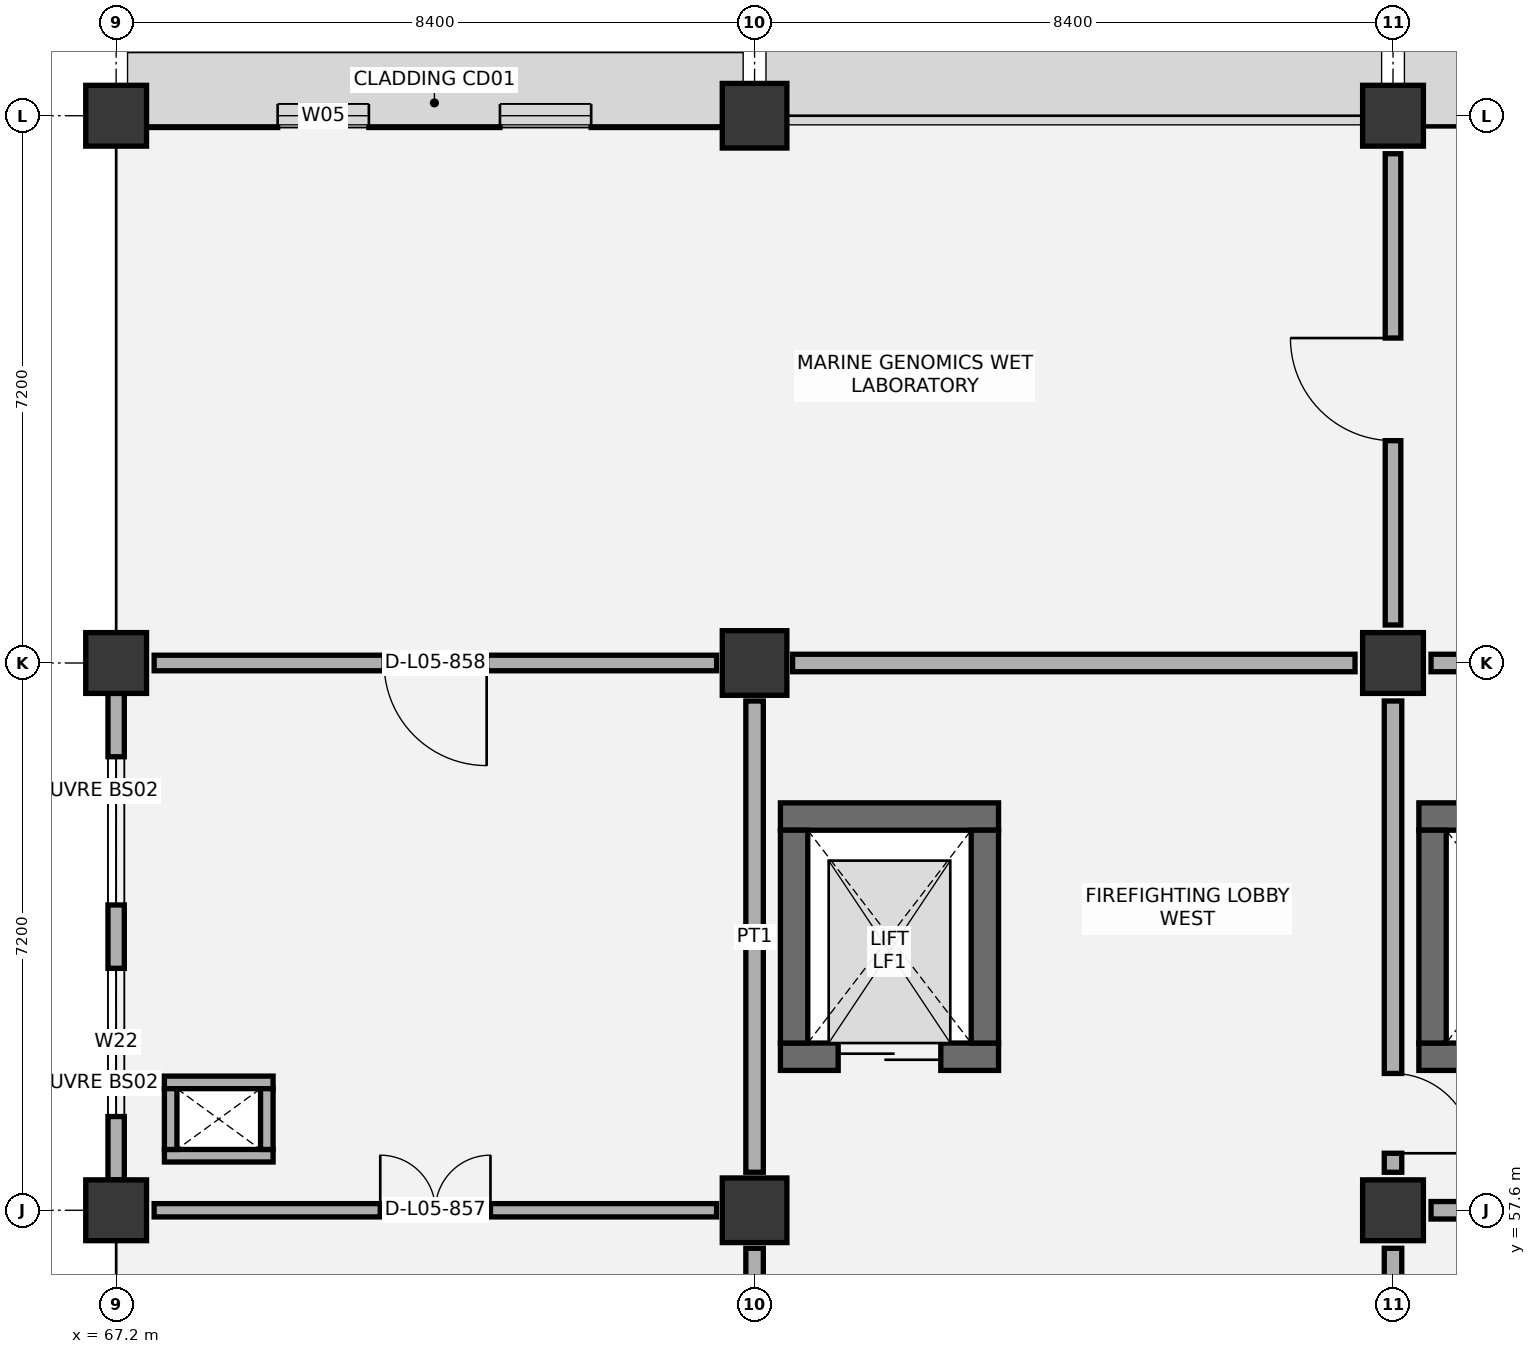
"""IFC4 building model, lengths in metres.
Left out: names, types, materials, properties, quantities, classifications, styles, units other than length and angle.
Written with IfcOpenShell. Run it as: python <this file> out.ifc"""

import sys

from ifc_helpers import new_model, si_unit, direction, frame, frame_2d, origin, origin_2d, place, context, subcontext, project, spatial, rectangle, extrude, element, fill, save


model = new_model("IFC4")
c1 = context("Model", 3, precision=1e-05, world=origin(), true_north=direction((0.0, 1.0)))
c2 = subcontext(c1, "Body", "Model", "MODEL_VIEW")
j1 = project(units=[si_unit("LENGTHUNIT", "METRE"), si_unit("PLANEANGLEUNIT", "RADIAN")], contexts=[c1])
p1 = place(None, origin())
s1 = spatial("IfcSite", under=j1, at=p1, CompositionType="ELEMENT")
p2 = place(p1, origin())
s2 = spatial("IfcBuilding", under=s1, at=p2, CompositionType="ELEMENT")
p3 = place(p2, frame((0.0, 0.0, 27.0)))
s3 = spatial("IfcBuildingStorey", under=s2, at=p3, CompositionType="ELEMENT", Elevation=27.0)
for number, where, z_axis, x_axis in (
    (1, (67.2, 57.6, 0.0), (0.0, 0.0, 1.0), (1.0, 0.0, 0.0)),
    (2, (67.2, 64.8, 0.0), (0.0, 0.0, 1.0), (1.0, 0.0, 0.0)),
    (3, (67.2, 72.0, 0.0), (0.0, 0.0, 1.0), (1.0, 0.0, 0.0)),
):
    element("IfcColumn", number, at=place(p3, frame(where, z_axis=z_axis, x_axis=x_axis)), inside=s3, PredefinedType="COLUMN", context=c2, shape_type="SweptSolid", body=[
        extrude(rectangle(XDim=0.8, YDim=0.8, at=origin_2d()), origin(), (0.0, 0.0, 1.0), 4.2),
    ])
for number, where, z_axis, x_axis in (
    (4, (75.6, 57.6, 0.0), (0.0, 0.0, 1.0), (1.0, 0.0, 0.0)),
    (5, (75.6, 64.8, 0.0), (0.0, 0.0, 1.0), (1.0, 0.0, 0.0)),
    (6, (75.6, 72.0, 0.0), (0.0, 0.0, 1.0), (1.0, 0.0, 0.0)),
):
    element("IfcColumn", number, at=place(p3, frame(where, z_axis=z_axis, x_axis=x_axis)), inside=s3, PredefinedType="COLUMN", context=c2, shape_type="SweptSolid", body=[
        extrude(rectangle(XDim=0.85, YDim=0.85, at=origin_2d()), origin(), (0.0, 0.0, 1.0), 4.2),
    ])
for number, where, z_axis, x_axis in (
    (7, (84.0, 57.6, 0.0), (0.0, 0.0, 1.0), (1.0, 0.0, 0.0)),
    (8, (84.0, 64.8, 0.0), (0.0, 0.0, 1.0), (1.0, 0.0, 0.0)),
    (9, (84.0, 72.0, 0.0), (0.0, 0.0, 1.0), (1.0, 0.0, 0.0)),
):
    element("IfcColumn", number, at=place(p3, frame(where, z_axis=z_axis, x_axis=x_axis)), inside=s3, PredefinedType="COLUMN", context=c2, shape_type="SweptSolid", body=[
        extrude(rectangle(XDim=0.8, YDim=0.8, at=origin_2d()), origin(), (0.0, 0.0, 1.0), 4.2),
    ])
p4 = place(p3, frame((75.94, 62.78, 0.0), z_axis=(0.0, 0.0, 1.0), x_axis=(1.0, 0.0, 0.0)))
e10 = element("IfcWall", 10, at=p4, inside=s3, PredefinedType="SHEAR", context=c2, shape_type="SweptSolid", body=[
    extrude(rectangle(XDim=2.87, YDim=0.36, at=frame_2d((1.435, 0.0))), origin(), (0.0, 0.0, 1.0), 3.92),
])
p5 = place(p3, frame((75.94, 59.62, 0.0), z_axis=(0.0, 0.0, 1.0), x_axis=(1.0, 0.0, 0.0)))
e11 = element("IfcWall", 11, at=p5, inside=s3, PredefinedType="SHEAR", context=c2, shape_type="SweptSolid", body=[
    extrude(rectangle(XDim=2.87, YDim=0.36, at=frame_2d((1.435, 0.0))), origin(), (0.0, 0.0, 1.0), 3.92),
])
p6 = place(p5, frame((0.76, 0.0, 0.0)))
e12 = element("IfcOpeningElement", 12, at=p6, cuts=e11, PredefinedType="OPENING", context=c2, shape_type="SweptSolid", body=[
    extrude(rectangle(XDim=1.35, YDim=2.2, at=frame_2d((0.675, 1.1))), frame((0.0, 0.19, 0.0), z_axis=(0.0, -1.0, 0.0), x_axis=(1.0, 0.0, 0.0)), (0.0, 0.0, 1.0), 0.38),
])
for number, where, z_axis, x_axis in (
    (13, (76.12, 59.8, 0.0), (0.0, 0.0, 1.0), (0.0, 1.0, 0.0)),
    (14, (78.63, 59.8, 0.0), (0.0, 0.0, 1.0), (0.0, 1.0, 0.0)),
):
    element("IfcWall", number, at=place(p3, frame(where, z_axis=z_axis, x_axis=x_axis)), inside=s3, PredefinedType="SHEAR", context=c2, shape_type="SweptSolid", body=[
        extrude(rectangle(XDim=2.8, YDim=0.36, at=frame_2d((1.4, 0.0))), origin(), (0.0, 0.0, 1.0), 3.92),
    ])
p7 = place(p3, frame((84.34, 62.78, 0.0), z_axis=(0.0, 0.0, 1.0), x_axis=(1.0, 0.0, 0.0)))
e15 = element("IfcWall", 15, at=p7, inside=s3, PredefinedType="SHEAR", context=c2, shape_type="SweptSolid", body=[
    extrude(rectangle(XDim=7.77, YDim=0.36, at=frame_2d((3.885, 0.0))), origin(), (0.0, 0.0, 1.0), 3.92),
])
p8 = place(p3, frame((84.34, 59.62, 0.0), z_axis=(0.0, 0.0, 1.0), x_axis=(1.0, 0.0, 0.0)))
e16 = element("IfcWall", 16, at=p8, inside=s3, PredefinedType="SHEAR", context=c2, shape_type="SweptSolid", body=[
    extrude(rectangle(XDim=2.66, YDim=0.36, at=frame_2d((1.33, 0.0))), origin(), (0.0, 0.0, 1.0), 3.92),
])
p9 = place(p8, frame((0.78, 0.0, 0.0)))
e17 = element("IfcOpeningElement", 17, at=p9, cuts=e16, PredefinedType="OPENING", context=c2, shape_type="SweptSolid", body=[
    extrude(rectangle(XDim=1.1, YDim=2.15, at=frame_2d((0.55, 1.075))), frame((0.0, 0.19, 0.0), z_axis=(0.0, -1.0, 0.0), x_axis=(1.0, 0.0, 0.0)), (0.0, 0.0, 1.0), 0.38),
])
p10 = place(p3, frame((84.52, 59.8, 0.0), z_axis=(0.0, 0.0, 1.0), x_axis=(0.0, 1.0, 0.0)))
e18 = element("IfcWall", 18, at=p10, inside=s3, PredefinedType="SHEAR", context=c2, shape_type="SweptSolid", body=[
    extrude(rectangle(XDim=2.8, YDim=0.36, at=frame_2d((1.4, 0.0))), origin(), (0.0, 0.0, 1.0), 3.92),
])
p11 = place(p3, frame((67.2, 58.0, 0.0), z_axis=(0.0, 0.0, 1.0), x_axis=(0.0, 1.0, 0.0)))
e19 = element("IfcWall", 19, at=p11, inside=s3, PredefinedType="SOLIDWALL", context=c2, shape_type="SweptSolid", body=[
    extrude(rectangle(XDim=6.4, YDim=0.215, at=frame_2d((3.2, 0.0))), origin(), (0.0, 0.0, 1.0), 3.365),
])
p12 = place(p11, frame((0.833, 0.0, 0.9)))
e20 = element("IfcOpeningElement", 20, at=p12, cuts=e19, PredefinedType="OPENING", context=c2, shape_type="SweptSolid", body=[
    extrude(rectangle(XDim=1.95, YDim=1.95, at=frame_2d((0.975, 0.975))), frame((0.0, 0.117, 0.0), z_axis=(0.0, -1.0, 0.0), x_axis=(1.0, 0.0, 0.0)), (0.0, 0.0, 1.0), 0.235),
])
p13 = place(p11, frame((3.617, 0.0, 0.9)))
e21 = element("IfcOpeningElement", 21, at=p13, cuts=e19, PredefinedType="OPENING", context=c2, shape_type="SweptSolid", body=[
    extrude(rectangle(XDim=1.95, YDim=1.95, at=frame_2d((0.975, 0.975))), frame((0.0, 0.117, 0.0), z_axis=(0.0, -1.0, 0.0), x_axis=(1.0, 0.0, 0.0)), (0.0, 0.0, 1.0), 0.235),
])
p14 = place(p3, frame((67.6, 72.0, 0.0), z_axis=(0.0, 0.0, 1.0), x_axis=(1.0, 0.0, 0.0)))
e22 = element("IfcWall", 22, at=p14, inside=s3, PredefinedType="SOLIDWALL", context=c2, shape_type="SweptSolid", body=[
    extrude(rectangle(XDim=7.575, YDim=0.31, at=frame_2d((3.788, 0.0))), origin(), (0.0, 0.0, 1.0), 3.365),
])
p15 = place(p14, frame((1.725, 0.0, 0.9)))
e23 = element("IfcOpeningElement", 23, at=p15, cuts=e22, PredefinedType="OPENING", context=c2, shape_type="SweptSolid", body=[
    extrude(rectangle(XDim=1.2, YDim=1.8, at=frame_2d((0.6, 0.9))), frame((0.0, 0.165, 0.0), z_axis=(0.0, -1.0, 0.0), x_axis=(1.0, 0.0, 0.0)), (0.0, 0.0, 1.0), 0.33),
])
p16 = place(p14, frame((4.65, 0.0, 0.9)))
e24 = element("IfcOpeningElement", 24, at=p16, cuts=e22, PredefinedType="OPENING", context=c2, shape_type="SweptSolid", body=[
    extrude(rectangle(XDim=1.2, YDim=1.8, at=frame_2d((0.6, 0.9))), frame((0.0, 0.165, 0.0), z_axis=(0.0, -1.0, 0.0), x_axis=(1.0, 0.0, 0.0)), (0.0, 0.0, 1.0), 0.33),
])
p17 = place(p3, frame((84.4, 72.0, 0.0), z_axis=(0.0, 0.0, 1.0), x_axis=(1.0, 0.0, 0.0)))
e25 = element("IfcWall", 25, at=p17, inside=s3, PredefinedType="SOLIDWALL", context=c2, shape_type="SweptSolid", body=[
    extrude(rectangle(XDim=7.6, YDim=0.27, at=frame_2d((3.8, 0.0))), origin(), (0.0, 0.0, 1.0), 3.365),
])
p18 = place(p17, frame((1.333, 0.0, 0.9)))
e26 = element("IfcOpeningElement", 26, at=p18, cuts=e25, PredefinedType="OPENING", context=c2, shape_type="SweptSolid", body=[
    extrude(rectangle(XDim=1.8, YDim=1.8, at=frame_2d((0.9, 0.9))), frame((0.0, 0.145, 0.0), z_axis=(0.0, -1.0, 0.0), x_axis=(1.0, 0.0, 0.0)), (0.0, 0.0, 1.0), 0.29),
])
p19 = place(p17, frame((4.467, 0.0, 0.9)))
e27 = element("IfcOpeningElement", 27, at=p19, cuts=e25, PredefinedType="OPENING", context=c2, shape_type="SweptSolid", body=[
    extrude(rectangle(XDim=1.8, YDim=1.8, at=frame_2d((0.9, 0.9))), frame((0.0, 0.145, 0.0), z_axis=(0.0, -1.0, 0.0), x_axis=(1.0, 0.0, 0.0)), (0.0, 0.0, 1.0), 0.29),
])
for number, where, z_axis, x_axis in (
    (28, (67.835, 58.317, 0.0), (0.0, 0.0, 1.0), (1.0, 0.0, 0.0)),
    (29, (67.835, 59.282, 0.0), (0.0, 0.0, 1.0), (1.0, 0.0, 0.0)),
):
    element("IfcWall", number, at=place(p3, frame(where, z_axis=z_axis, x_axis=x_axis)), inside=s3, PredefinedType="PARTITIONING", context=c2, shape_type="SweptSolid", body=[
        extrude(rectangle(XDim=1.43, YDim=0.165, at=frame_2d((0.715, 0.0))), origin(), (0.0, 0.0, 1.0), 3.92),
    ])
for number, where, z_axis, x_axis in (
    (30, (67.917, 58.4, 0.0), (0.0, 0.0, 1.0), (0.0, 1.0, 0.0)),
    (31, (69.183, 58.4, 0.0), (0.0, 0.0, 1.0), (0.0, 1.0, 0.0)),
):
    element("IfcWall", number, at=place(p3, frame(where, z_axis=z_axis, x_axis=x_axis)), inside=s3, PredefinedType="PARTITIONING", context=c2, shape_type="SweptSolid", body=[
        extrude(rectangle(XDim=0.8, YDim=0.165, at=frame_2d((0.4, 0.0))), origin(), (0.0, 0.0, 1.0), 3.92),
    ])
p20 = place(p3, frame((75.6, 50.9, 0.0), z_axis=(0.0, 0.0, 1.0), x_axis=(0.0, 1.0, 0.0)))
e32 = element("IfcWall", 32, at=p20, inside=s3, PredefinedType="PARTITIONING", context=c2, shape_type="SweptSolid", body=[
    extrude(rectangle(XDim=6.2, YDim=0.23, at=frame_2d((3.1, 0.0))), origin(), (0.0, 0.0, 1.0), 3.265),
])
p21 = place(p20, frame((0.05, 0.0, 0.0)))
e33 = element("IfcOpeningElement", 33, at=p21, cuts=e32, PredefinedType="OPENING", context=c2, shape_type="SweptSolid", body=[
    extrude(rectangle(XDim=1.05, YDim=2.15, at=frame_2d((0.525, 1.075))), frame((0.0, 0.125, 0.0), z_axis=(0.0, -1.0, 0.0), x_axis=(1.0, 0.0, 0.0)), (0.0, 0.0, 1.0), 0.25),
])
p22 = place(p3, frame((67.7, 57.6, 0.0), z_axis=(0.0, 0.0, 1.0), x_axis=(1.0, 0.0, 0.0)))
e34 = element("IfcWall", 34, at=p22, inside=s3, PredefinedType="PARTITIONING", context=c2, shape_type="SweptSolid", body=[
    extrude(rectangle(XDim=7.4, YDim=0.175, at=frame_2d((3.7, 0.0))), origin(), (0.0, 0.0, 1.0), 3.215),
])
p23 = place(p22, frame((2.975, 0.0, 0.0)))
e35 = element("IfcOpeningElement", 35, at=p23, cuts=e34, PredefinedType="OPENING", context=c2, shape_type="SweptSolid", body=[
    extrude(rectangle(XDim=1.45, YDim=2.2, at=frame_2d((0.725, 1.1))), frame((0.0, 0.097, 0.0), z_axis=(0.0, -1.0, 0.0), x_axis=(1.0, 0.0, 0.0)), (0.0, 0.0, 1.0), 0.195),
])
p24 = place(p3, frame((75.6, 58.1, 0.0), z_axis=(0.0, 0.0, 1.0), x_axis=(0.0, 1.0, 0.0)))
e36 = element("IfcWall", 36, at=p24, inside=s3, PredefinedType="PARTITIONING", context=c2, shape_type="SweptSolid", body=[
    extrude(rectangle(XDim=6.2, YDim=0.23, at=frame_2d((3.1, 0.0))), origin(), (0.0, 0.0, 1.0), 3.415),
])
p25 = place(p3, frame((67.7, 64.8, 0.0), z_axis=(0.0, 0.0, 1.0), x_axis=(1.0, 0.0, 0.0)))
e37 = element("IfcWall", 37, at=p25, inside=s3, PredefinedType="PARTITIONING", context=c2, shape_type="SweptSolid", body=[
    extrude(rectangle(XDim=7.4, YDim=0.205, at=frame_2d((3.7, 0.0))), origin(), (0.0, 0.0, 1.0), 3.215),
])
p26 = place(p25, frame((3.025, 0.0, 0.0)))
e38 = element("IfcOpeningElement", 38, at=p26, cuts=e37, PredefinedType="OPENING", context=c2, shape_type="SweptSolid", body=[
    extrude(rectangle(XDim=1.35, YDim=2.15, at=frame_2d((0.675, 1.075))), frame((0.0, 0.113, 0.0), z_axis=(0.0, -1.0, 0.0), x_axis=(1.0, 0.0, 0.0)), (0.0, 0.0, 1.0), 0.225),
])
p27 = place(p3, frame((84.0, 50.9, 0.0), z_axis=(0.0, 0.0, 1.0), x_axis=(0.0, 1.0, 0.0)))
e39 = element("IfcWall", 39, at=p27, inside=s3, PredefinedType="PARTITIONING", context=c2, shape_type="SweptSolid", body=[
    extrude(rectangle(XDim=6.2, YDim=0.23, at=frame_2d((3.1, 0.0))), origin(), (0.0, 0.0, 1.0), 3.415),
])
p28 = place(p27, frame((0.05, 0.0, 0.0)))
e40 = element("IfcOpeningElement", 40, at=p28, cuts=e39, PredefinedType="OPENING", context=c2, shape_type="SweptSolid", body=[
    extrude(rectangle(XDim=1.05, YDim=2.15, at=frame_2d((0.525, 1.075))), frame((0.0, 0.125, 0.0), z_axis=(0.0, -1.0, 0.0), x_axis=(1.0, 0.0, 0.0)), (0.0, 0.0, 1.0), 0.25),
])
p29 = place(p3, frame((84.0, 58.1, 0.0), z_axis=(0.0, 0.0, 1.0), x_axis=(0.0, 1.0, 0.0)))
e41 = element("IfcWall", 41, at=p29, inside=s3, PredefinedType="PARTITIONING", context=c2, shape_type="SweptSolid", body=[
    extrude(rectangle(XDim=6.2, YDim=0.23, at=frame_2d((3.1, 0.0))), origin(), (0.0, 0.0, 1.0), 3.265),
])
p30 = place(p29, frame((0.25, 0.0, 0.0)))
e42 = element("IfcOpeningElement", 42, at=p30, cuts=e41, PredefinedType="OPENING", context=c2, shape_type="SweptSolid", body=[
    extrude(rectangle(XDim=1.05, YDim=2.15, at=frame_2d((0.525, 1.075))), frame((0.0, 0.125, 0.0), z_axis=(0.0, -1.0, 0.0), x_axis=(1.0, 0.0, 0.0)), (0.0, 0.0, 1.0), 0.25),
])
p31 = place(p3, frame((76.1, 64.8, 0.0), z_axis=(0.0, 0.0, 1.0), x_axis=(1.0, 0.0, 0.0)))
e43 = element("IfcWall", 43, at=p31, inside=s3, PredefinedType="PARTITIONING", context=c2, shape_type="SweptSolid", body=[
    extrude(rectangle(XDim=7.4, YDim=0.23, at=frame_2d((3.7, 0.0))), origin(), (0.0, 0.0, 1.0), 3.465),
])
p32 = place(p3, frame((84.0, 65.3, 0.0), z_axis=(0.0, 0.0, 1.0), x_axis=(0.0, 1.0, 0.0)))
e44 = element("IfcWall", 44, at=p32, inside=s3, PredefinedType="PARTITIONING", context=c2, shape_type="SweptSolid", body=[
    extrude(rectangle(XDim=6.2, YDim=0.205, at=frame_2d((3.1, 0.0))), origin(), (0.0, 0.0, 1.0), 3.515),
])
p33 = place(p32, frame((2.425, 0.0, 0.0)))
e45 = element("IfcOpeningElement", 45, at=p33, cuts=e44, PredefinedType="OPENING", context=c2, shape_type="SweptSolid", body=[
    extrude(rectangle(XDim=1.35, YDim=2.15, at=frame_2d((0.675, 1.075))), frame((0.0, 0.113, 0.0), z_axis=(0.0, -1.0, 0.0), x_axis=(1.0, 0.0, 0.0)), (0.0, 0.0, 1.0), 0.225),
])
p34 = place(p3, frame((84.5, 57.6, 0.0), z_axis=(0.0, 0.0, 1.0), x_axis=(1.0, 0.0, 0.0)))
e46 = element("IfcWall", 46, at=p34, inside=s3, PredefinedType="PARTITIONING", context=c2, shape_type="SweptSolid", body=[
    extrude(rectangle(XDim=7.4, YDim=0.23, at=frame_2d((3.7, 0.0))), origin(), (0.0, 0.0, 1.0), 3.515),
])
p35 = place(p34, frame((2.95, 0.0, 0.0)))
e47 = element("IfcOpeningElement", 47, at=p35, cuts=e46, PredefinedType="OPENING", context=c2, shape_type="SweptSolid", body=[
    extrude(rectangle(XDim=1.5, YDim=2.15, at=frame_2d((0.75, 1.075))), frame((0.0, 0.125, 0.0), z_axis=(0.0, -1.0, 0.0), x_axis=(1.0, 0.0, 0.0)), (0.0, 0.0, 1.0), 0.25),
])
p36 = place(p3, frame((84.5, 64.8, 0.0), z_axis=(0.0, 0.0, 1.0), x_axis=(1.0, 0.0, 0.0)))
e48 = element("IfcWall", 48, at=p36, inside=s3, PredefinedType="PARTITIONING", context=c2, shape_type="SweptSolid", body=[
    extrude(rectangle(XDim=7.4, YDim=0.23, at=frame_2d((3.7, 0.0))), origin(), (0.0, 0.0, 1.0), 3.515),
])
p37 = place(p12, origin())
e49 = element("IfcWindow", 49, at=p37, inside=s3, PartitioningType="SINGLE_PANEL", PredefinedType="WINDOW", context=c2, shape_type="SweptSolid", body=[
    extrude(rectangle(XDim=1.95, YDim=1.95, at=frame_2d((0.975, 0.975))), frame((0.0, 0.03, 0.0), z_axis=(0.0, -1.0, 0.0), x_axis=(1.0, 0.0, 0.0)), (0.0, 0.0, 1.0), 0.06),
])
fill(e20, e49)
p38 = place(p13, origin())
e50 = element("IfcWindow", 50, at=p38, inside=s3, PartitioningType="SINGLE_PANEL", PredefinedType="WINDOW", context=c2, shape_type="SweptSolid", body=[
    extrude(rectangle(XDim=1.95, YDim=1.95, at=frame_2d((0.975, 0.975))), frame((0.0, 0.03, 0.0), z_axis=(0.0, -1.0, 0.0), x_axis=(1.0, 0.0, 0.0)), (0.0, 0.0, 1.0), 0.06),
])
fill(e21, e50)
p39 = place(p15, origin())
e51 = element("IfcWindow", 51, at=p39, inside=s3, PartitioningType="SINGLE_PANEL", PredefinedType="WINDOW", context=c2, shape_type="SweptSolid", body=[
    extrude(rectangle(XDim=1.2, YDim=1.8, at=frame_2d((0.6, 0.9))), frame((0.0, 0.03, 0.0), z_axis=(0.0, -1.0, 0.0), x_axis=(1.0, 0.0, 0.0)), (0.0, 0.0, 1.0), 0.06),
])
fill(e23, e51)
p40 = place(p16, origin())
e52 = element("IfcWindow", 52, at=p40, inside=s3, PartitioningType="SINGLE_PANEL", PredefinedType="WINDOW", context=c2, shape_type="SweptSolid", body=[
    extrude(rectangle(XDim=1.2, YDim=1.8, at=frame_2d((0.6, 0.9))), frame((0.0, 0.03, 0.0), z_axis=(0.0, -1.0, 0.0), x_axis=(1.0, 0.0, 0.0)), (0.0, 0.0, 1.0), 0.06),
])
fill(e24, e52)
p41 = place(p6, origin())
e53 = element("IfcDoor", 53, at=p41, inside=s3, OperationType="DOUBLE_DOOR_SLIDING", PredefinedType="DOOR", context=c2, shape_type="SweptSolid", body=[
    extrude(rectangle(XDim=1.35, YDim=2.2, at=frame_2d((0.675, 1.1))), frame((0.0, 0.025, 0.0), z_axis=(0.0, -1.0, 0.0), x_axis=(1.0, 0.0, 0.0)), (0.0, 0.0, 1.0), 0.05),
])
fill(e12, e53)
p42 = place(p23, origin())
e54 = element("IfcDoor", 54, at=p42, inside=s3, OperationType="DOUBLE_DOOR_SINGLE_SWING", PredefinedType="DOOR", context=c2, shape_type="SweptSolid", body=[
    extrude(rectangle(XDim=1.45, YDim=2.2, at=frame_2d((0.725, 1.1))), frame((0.0, 0.025, 0.0), z_axis=(0.0, -1.0, 0.0), x_axis=(1.0, 0.0, 0.0)), (0.0, 0.0, 1.0), 0.05),
])
fill(e35, e54)
p43 = place(p26, frame((1.35, 0.0, 0.0), z_axis=(0.0, 0.0, 1.0), x_axis=(-1.0, 0.0, 0.0)))
e55 = element("IfcDoor", 55, at=p43, inside=s3, OperationType="SINGLE_SWING_LEFT", PredefinedType="DOOR", context=c2, shape_type="SweptSolid", body=[
    extrude(rectangle(XDim=1.35, YDim=2.15, at=frame_2d((0.675, 1.075))), frame((0.0, 0.025, 0.0), z_axis=(0.0, -1.0, 0.0), x_axis=(1.0, 0.0, 0.0)), (0.0, 0.0, 1.0), 0.05),
])
fill(e38, e55)
p44 = place(p30, frame((1.05, 0.0, 0.0), z_axis=(0.0, 0.0, 1.0), x_axis=(-1.0, 0.0, 0.0)))
e56 = element("IfcDoor", 56, at=p44, inside=s3, OperationType="SINGLE_SWING_RIGHT", PredefinedType="DOOR", context=c2, shape_type="SweptSolid", body=[
    extrude(rectangle(XDim=1.05, YDim=2.15, at=frame_2d((0.525, 1.075))), frame((0.0, 0.025, 0.0), z_axis=(0.0, -1.0, 0.0), x_axis=(1.0, 0.0, 0.0)), (0.0, 0.0, 1.0), 0.05),
])
fill(e42, e56)
p45 = place(p33, origin())
e57 = element("IfcDoor", 57, at=p45, inside=s3, OperationType="SINGLE_SWING_RIGHT", PredefinedType="DOOR", context=c2, shape_type="SweptSolid", body=[
    extrude(rectangle(XDim=1.35, YDim=2.15, at=frame_2d((0.675, 1.075))), frame((0.0, 0.025, 0.0), z_axis=(0.0, -1.0, 0.0), x_axis=(1.0, 0.0, 0.0)), (0.0, 0.0, 1.0), 0.05),
])
fill(e45, e57)
save(model, sys.argv[1])
